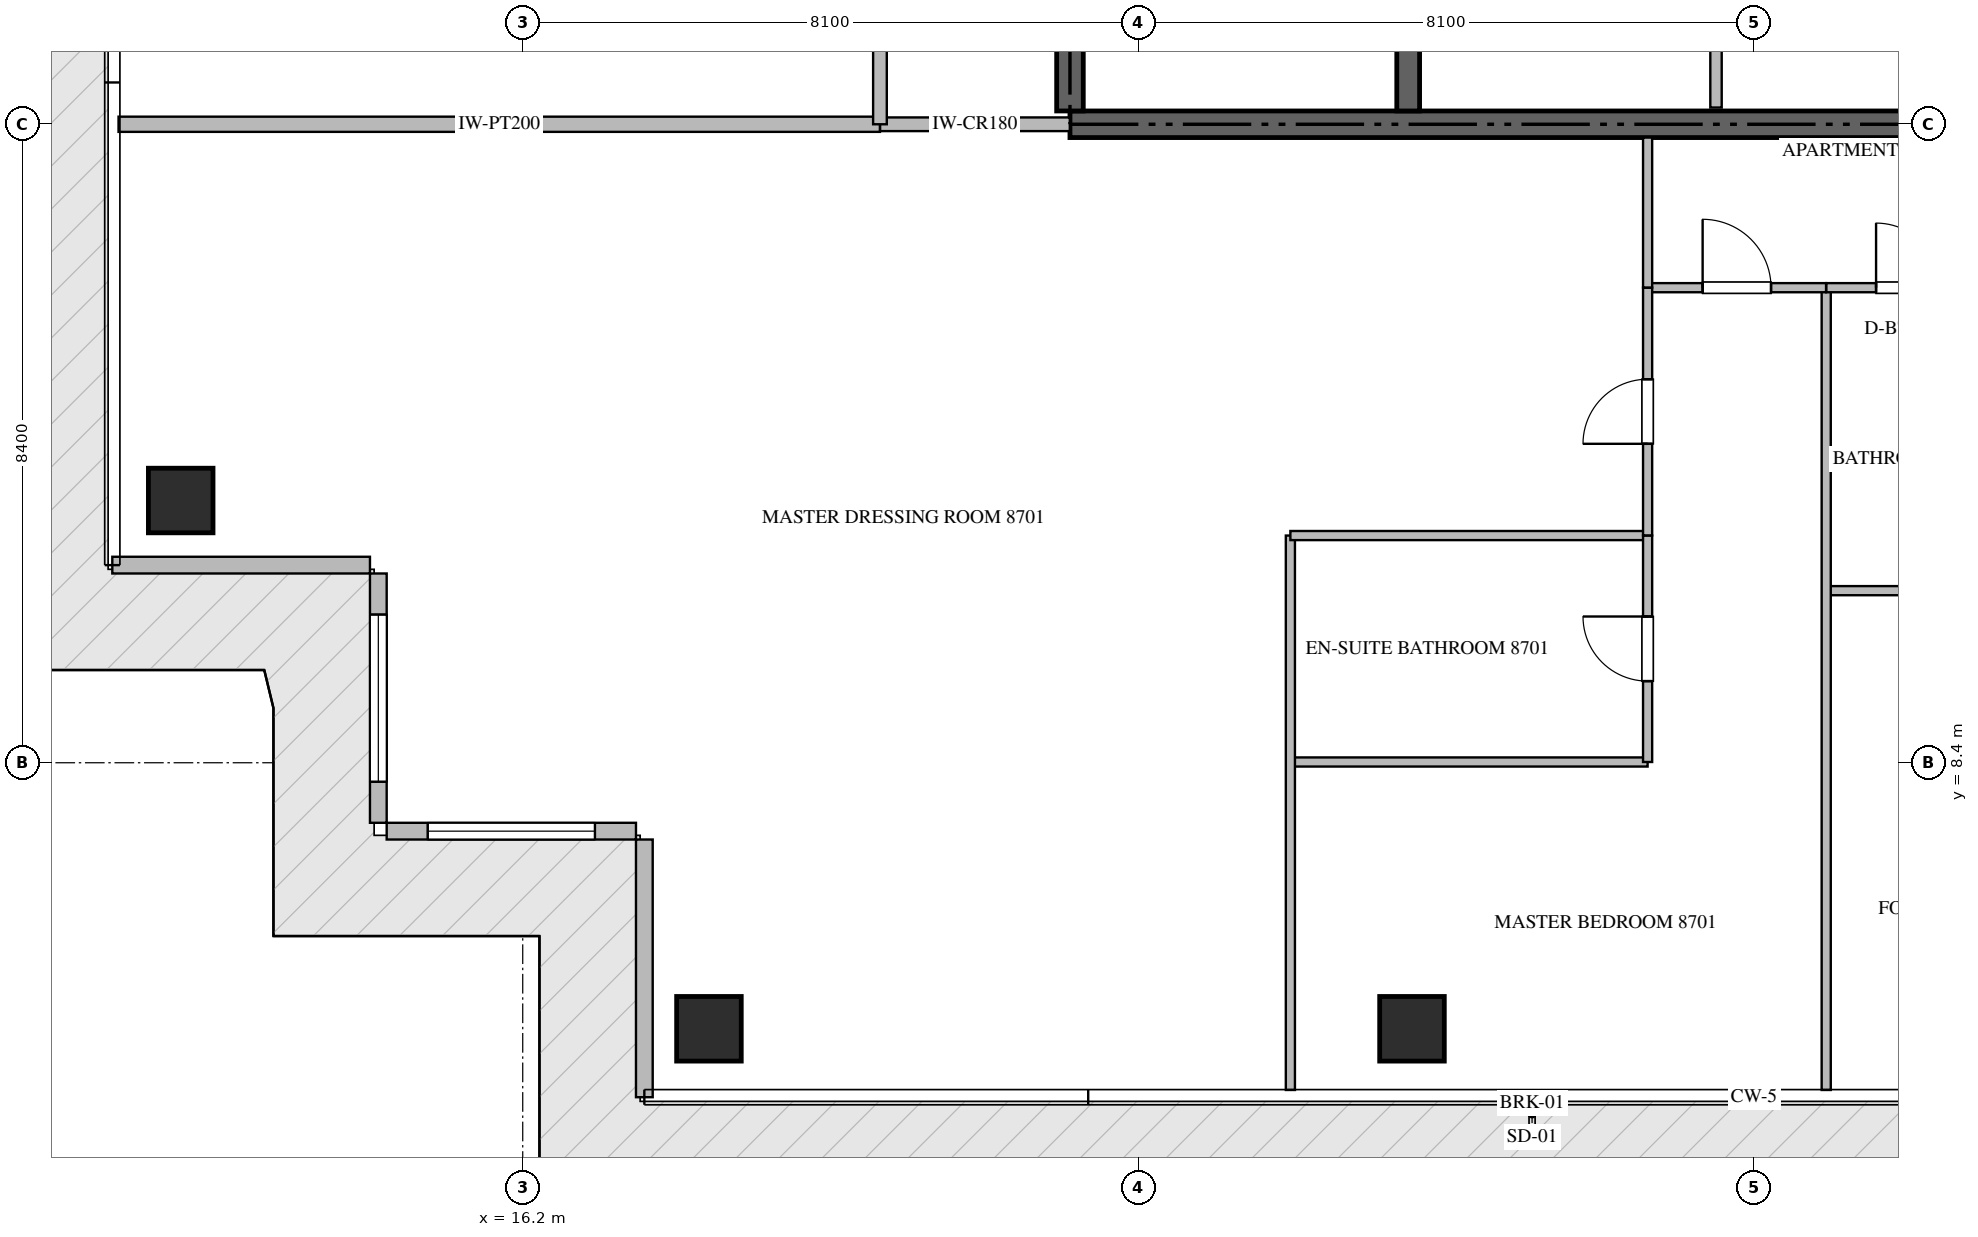
"""IFC4 building model, lengths in metres.
Left out: names, types, materials, properties, quantities, classifications, styles, units other than length and angle.
Written with IfcOpenShell. Run it as: python <this file> out.ifc"""

import sys

from ifc_helpers import new_model, si_unit, direction, frame, frame_2d, origin, origin_2d, place, context, subcontext, project, spatial, rectangle, extrude, source, transform, mapped, element, fill, save


model = new_model("IFC4")
c1 = context("Model", 3, precision=1e-05, world=origin(), true_north=direction((0.0, 1.0)))
c2 = subcontext(c1, "Body", "Model", "MODEL_VIEW")
j1 = project(units=[si_unit("LENGTHUNIT", "METRE"), si_unit("PLANEANGLEUNIT", "RADIAN")], contexts=[c1])
p1 = place(None, origin())
s1 = spatial("IfcSite", under=j1, at=p1, CompositionType="ELEMENT")
p2 = place(p1, origin())
s2 = spatial("IfcBuilding", under=s1, at=p2, CompositionType="ELEMENT")
p3 = place(p2, frame((0.0, 0.0, 353.85)))
s3 = spatial("IfcBuildingStorey", under=s2, at=p3, CompositionType="ELEMENT", Elevation=353.85)
p4 = place(p3, frame((23.4, 16.8, -0.26), z_axis=(0.0, 0.0, 1.0), x_axis=(1.0, 0.0, 0.0)))
e1 = element("IfcWall", 1, at=p4, inside=s3, PredefinedType="SHEAR", context=c2, shape_type="SweptSolid", body=[
    extrude(rectangle(XDim=18.0, YDim=0.35, at=frame_2d((9.0, 0.0))), origin(), (0.0, 0.0, 1.0), 5.798),
])
p5 = place(p3, frame((23.4, 16.975, -0.26), z_axis=(0.0, 0.0, 1.0), x_axis=(0.0, 1.0, 0.0)))
e2 = element("IfcWall", 2, at=p5, inside=s3, PredefinedType="SHEAR", context=c2, shape_type="SweptSolid", body=[
    extrude(rectangle(XDim=4.875, YDim=0.35, at=frame_2d((2.438, 0.0))), origin(), (0.0, 0.0, 1.0), 5.798),
])
p6 = place(p3, frame((27.85, 16.975, -0.26), z_axis=(0.0, 0.0, 1.0), x_axis=(0.0, 1.0, 0.0)))
e3 = element("IfcWall", 3, at=p6, inside=s3, PredefinedType="SHEAR", context=c2, shape_type="SweptSolid", body=[
    extrude(rectangle(XDim=4.875, YDim=0.3, at=frame_2d((2.438, 0.0))), origin(), (0.0, 0.0, 1.0), 5.798),
])
m1 = source(origin(), c2, "Body", "SweptSolid", [
    extrude(rectangle(XDim=0.85, YDim=0.85, at=origin_2d()), origin(), (0.0, 0.0, 1.0), 5.8),
])
for number, where, z_axis, x_axis in (
    (4, (18.65, 4.9, -0.26), (0.0, 0.0, 1.0), (1.0, 0.0, 0.0)),
    (5, (27.9, 4.9, -0.26), (0.0, 0.0, 1.0), (1.0, 0.0, 0.0)),
    (6, (11.7, 11.85, -0.26), (0.0, 0.0, 1.0), (1.0, 0.0, 0.0)),
):
    element("IfcColumn", number, at=place(p3, frame(where, z_axis=z_axis, x_axis=x_axis)), inside=s3, PredefinedType="COLUMN", context=c2, shape_type="MappedRepresentation", body=[
        mapped(m1, transform((0.0, 0.0, 0.0), scale=1.0)),
    ])
p7 = place(p3, frame((10.8, 11.0, 0.0), z_axis=(0.0, 0.0, 1.0), x_axis=(1.0, 0.0, 0.0)))
e7 = element("IfcWall", 7, at=p7, inside=s3, PredefinedType="ELEMENTEDWALL", context=c2, shape_type="SweptSolid", body=[
    extrude(rectangle(XDim=3.39, YDim=0.22, at=frame_2d((1.695, 0.0))), origin(), (0.0, 0.0, 1.0), 5.525),
])
p8 = place(p3, frame((14.3, 10.89, 0.0), z_axis=(0.0, 0.0, 1.0), x_axis=(0.0, -1.0, 0.0)))
e8 = element("IfcWall", 8, at=p8, inside=s3, PredefinedType="ELEMENTEDWALL", context=c2, shape_type="SweptSolid", body=[
    extrude(rectangle(XDim=3.28, YDim=0.22, at=frame_2d((1.64, 0.0))), origin(), (0.0, 0.0, 1.0), 5.525),
])
p9 = place(p8, frame((0.54, 0.0, 0.65)))
e9 = element("IfcOpeningElement", 9, at=p9, cuts=e8, PredefinedType="OPENING", context=c2, shape_type="SweptSolid", body=[
    extrude(rectangle(XDim=2.2, YDim=2.4, at=frame_2d((1.1, 1.2))), frame((0.0, 0.12, 0.0), z_axis=(0.0, -1.0, 0.0), x_axis=(1.0, 0.0, 0.0)), (0.0, 0.0, 1.0), 0.24),
])
p10 = place(p3, frame((14.41, 7.5, 0.0), z_axis=(0.0, 0.0, 1.0), x_axis=(1.0, 0.0, 0.0)))
e10 = element("IfcWall", 10, at=p10, inside=s3, PredefinedType="ELEMENTEDWALL", context=c2, shape_type="SweptSolid", body=[
    extrude(rectangle(XDim=3.28, YDim=0.22, at=frame_2d((1.64, 0.0))), origin(), (0.0, 0.0, 1.0), 5.525),
])
p11 = place(p10, frame((0.54, 0.0, 0.65)))
e11 = element("IfcOpeningElement", 11, at=p11, cuts=e10, PredefinedType="OPENING", context=c2, shape_type="SweptSolid", body=[
    extrude(rectangle(XDim=2.2, YDim=2.4, at=frame_2d((1.1, 1.2))), frame((0.0, 0.12, 0.0), z_axis=(0.0, -1.0, 0.0), x_axis=(1.0, 0.0, 0.0)), (0.0, 0.0, 1.0), 0.24),
])
p12 = place(p3, frame((17.8, 7.39, 0.0), z_axis=(0.0, 0.0, 1.0), x_axis=(0.0, -1.0, 0.0)))
e12 = element("IfcWall", 12, at=p12, inside=s3, PredefinedType="ELEMENTEDWALL", context=c2, shape_type="SweptSolid", body=[
    extrude(rectangle(XDim=3.39, YDim=0.22, at=frame_2d((1.695, 0.0))), origin(), (0.0, 0.0, 1.0), 5.525),
])
p13 = place(p3, frame((31.9, 17.02, 0.0), z_axis=(0.0, 0.0, 1.0), x_axis=(0.0, 1.0, 0.0)))
e13 = element("IfcWall", 13, at=p13, inside=s3, PredefinedType="PARTITIONING", context=c2, shape_type="SweptSolid", body=[
    extrude(rectangle(XDim=2.73, YDim=0.15, at=frame_2d((1.365, 0.0))), origin(), (0.0, 0.0, 1.0), 5.54),
])
p14 = place(p3, frame((10.882, 16.8, 0.0), z_axis=(0.0, 0.0, 1.0), x_axis=(1.0, 0.0, 0.0)))
e14 = element("IfcWall", 14, at=p14, inside=s3, PredefinedType="PARTITIONING", context=c2, shape_type="SweptSolid", body=[
    extrude(rectangle(XDim=10.018, YDim=0.2, at=frame_2d((5.009, 0.0))), origin(), (0.0, 0.0, 1.0), 5.54),
])
p15 = place(p3, frame((20.902, 16.8, 0.0), z_axis=(0.0, 0.0, 1.0), x_axis=(1.0, 0.0, 0.0)))
e15 = element("IfcWall", 15, at=p15, inside=s3, PredefinedType="PARTITIONING", context=c2, shape_type="SweptSolid", body=[
    extrude(rectangle(XDim=2.496, YDim=0.18, at=frame_2d((1.248, 0.0))), origin(), (0.0, 0.0, 1.0), 5.54),
])
p16 = place(p3, frame((20.9, 16.8, 0.0), z_axis=(0.0, 0.0, 1.0), x_axis=(0.0, 1.0, 0.0)))
e16 = element("IfcWall", 16, at=p16, inside=s3, PredefinedType="PARTITIONING", context=c2, shape_type="SweptSolid", body=[
    extrude(rectangle(XDim=16.8, YDim=0.18, at=frame_2d((8.4, 0.0))), origin(), (0.0, 0.0, 1.0), 5.54),
])
p17 = place(p16, frame((1.3, 0.0, 0.0)))
e17 = element("IfcOpeningElement", 17, at=p17, cuts=e16, PredefinedType="OPENING", context=c2, shape_type="SweptSolid", body=[
    extrude(rectangle(XDim=1.0, YDim=2.15, at=frame_2d((0.5, 1.075))), frame((0.0, 0.1, 0.0), z_axis=(0.0, -1.0, 0.0), x_axis=(1.0, 0.0, 0.0)), (0.0, 0.0, 1.0), 0.2),
])
p18 = place(p3, frame((33.35, 10.664, 0.0), z_axis=(0.0, 0.0, 1.0), x_axis=(1.0, 0.0, 0.0)))
e18 = element("IfcWall", 18, at=p18, inside=s3, PredefinedType="PARTITIONING", context=c2, shape_type="SweptSolid", body=[
    extrude(rectangle(XDim=5.15, YDim=0.12, at=frame_2d((2.575, 0.0))), origin(), (0.0, 0.0, 1.0), 5.54),
])
p19 = place(p3, frame((33.35, 4.095, 0.0), z_axis=(0.0, 0.0, 1.0), x_axis=(0.0, 1.0, 0.0)))
e19 = element("IfcWall", 19, at=p19, inside=s3, PredefinedType="PARTITIONING", context=c2, shape_type="SweptSolid", body=[
    extrude(rectangle(XDim=10.555, YDim=0.12, at=frame_2d((5.277, 0.0))), origin(), (0.0, 0.0, 1.0), 5.54),
])
p20 = place(p3, frame((33.35, 14.65, 0.0), z_axis=(0.0, 0.0, 1.0), x_axis=(1.0, 0.0, 0.0)))
e20 = element("IfcWall", 20, at=p20, inside=s3, PredefinedType="PARTITIONING", context=c2, shape_type="SweptSolid", body=[
    extrude(rectangle(XDim=2.163, YDim=0.12, at=frame_2d((1.082, 0.0))), origin(), (0.0, 0.0, 1.0), 5.54),
])
p21 = place(p20, frame((0.656, 0.0, 0.0)))
e21 = element("IfcOpeningElement", 21, at=p21, cuts=e20, PredefinedType="OPENING", context=c2, shape_type="SweptSolid", body=[
    extrude(rectangle(XDim=0.85, YDim=2.1, at=frame_2d((0.425, 1.05))), frame((0.0, 0.07, 0.0), z_axis=(0.0, -1.0, 0.0), x_axis=(1.0, 0.0, 0.0)), (0.0, 0.0, 1.0), 0.14),
])
p22 = place(p3, frame((31.0, 14.65, 0.0), z_axis=(0.0, 0.0, 1.0), x_axis=(1.0, 0.0, 0.0)))
e22 = element("IfcWall", 22, at=p22, inside=s3, PredefinedType="PARTITIONING", context=c2, shape_type="SweptSolid", body=[
    extrude(rectangle(XDim=2.348, YDim=0.12, at=frame_2d((1.174, 0.0))), origin(), (0.0, 0.0, 1.0), 5.54),
])
p23 = place(p22, frame((0.724, 0.0, 0.0)))
e23 = element("IfcOpeningElement", 23, at=p23, cuts=e22, PredefinedType="OPENING", context=c2, shape_type="SweptSolid", body=[
    extrude(rectangle(XDim=0.9, YDim=2.1, at=frame_2d((0.45, 1.05))), frame((0.0, 0.07, 0.0), z_axis=(0.0, -1.0, 0.0), x_axis=(1.0, 0.0, 0.0)), (0.0, 0.0, 1.0), 0.14),
])
p24 = place(p3, frame((26.3, 8.41, 0.0), z_axis=(0.0, 0.0, 1.0), x_axis=(1.0, 0.0, 0.0)))
e24 = element("IfcWall", 24, at=p24, inside=s3, PredefinedType="PARTITIONING", context=c2, shape_type="SweptSolid", body=[
    extrude(rectangle(XDim=4.7, YDim=0.12, at=frame_2d((2.35, 0.0))), origin(), (0.0, 0.0, 1.0), 5.54),
])
p25 = place(p3, frame((26.3, 4.095, 0.0), z_axis=(0.0, 0.0, 1.0), x_axis=(0.0, 1.0, 0.0)))
e25 = element("IfcWall", 25, at=p25, inside=s3, PredefinedType="PARTITIONING", context=c2, shape_type="SweptSolid", body=[
    extrude(rectangle(XDim=7.294, YDim=0.12, at=frame_2d((3.647, 0.0))), origin(), (0.0, 0.0, 1.0), 5.54),
])
p26 = place(p3, frame((26.3, 11.389, 0.0), z_axis=(0.0, 0.0, 1.0), x_axis=(1.0, 0.0, 0.0)))
e26 = element("IfcWall", 26, at=p26, inside=s3, PredefinedType="PARTITIONING", context=c2, shape_type="SweptSolid", body=[
    extrude(rectangle(XDim=4.7, YDim=0.12, at=frame_2d((2.35, 0.0))), origin(), (0.0, 0.0, 1.0), 5.54),
])
p27 = place(p3, frame((31.0, 8.41, 0.0), z_axis=(0.0, 0.0, 1.0), x_axis=(0.0, 1.0, 0.0)))
e27 = element("IfcWall", 27, at=p27, inside=s3, PredefinedType="PARTITIONING", context=c2, shape_type="SweptSolid", body=[
    extrude(rectangle(XDim=2.979, YDim=0.12, at=frame_2d((1.49, 0.0))), origin(), (0.0, 0.0, 1.0), 5.54),
])
p28 = place(p27, frame((1.064, 0.0, 0.0)))
e28 = element("IfcOpeningElement", 28, at=p28, cuts=e27, PredefinedType="OPENING", context=c2, shape_type="SweptSolid", body=[
    extrude(rectangle(XDim=0.85, YDim=2.1, at=frame_2d((0.425, 1.05))), frame((0.0, 0.07, 0.0), z_axis=(0.0, -1.0, 0.0), x_axis=(1.0, 0.0, 0.0)), (0.0, 0.0, 1.0), 0.14),
])
p29 = place(p3, frame((31.0, 11.391, 0.0), z_axis=(0.0, 0.0, 1.0), x_axis=(0.0, 1.0, 0.0)))
e29 = element("IfcWall", 29, at=p29, inside=s3, PredefinedType="PARTITIONING", context=c2, shape_type="SweptSolid", body=[
    extrude(rectangle(XDim=3.259, YDim=0.12, at=frame_2d((1.629, 0.0))), origin(), (0.0, 0.0, 1.0), 5.54),
])
p30 = place(p29, frame((1.205, 0.0, 0.0)))
e30 = element("IfcOpeningElement", 30, at=p30, cuts=e29, PredefinedType="OPENING", context=c2, shape_type="SweptSolid", body=[
    extrude(rectangle(XDim=0.85, YDim=2.1, at=frame_2d((0.425, 1.05))), frame((0.0, 0.07, 0.0), z_axis=(0.0, -1.0, 0.0), x_axis=(1.0, 0.0, 0.0)), (0.0, 0.0, 1.0), 0.14),
])
p31 = place(p3, frame((31.0, 14.652, 0.0), z_axis=(0.0, 0.0, 1.0), x_axis=(0.0, 1.0, 0.0)))
e31 = element("IfcWall", 31, at=p31, inside=s3, PredefinedType="PARTITIONING", context=c2, shape_type="SweptSolid", body=[
    extrude(rectangle(XDim=1.973, YDim=0.12, at=frame_2d((0.986, 0.0))), origin(), (0.0, 0.0, 1.0), 5.54),
])
m2 = source(origin(), c2, "Body", "SweptSolid", [
    extrude(rectangle(XDim=2.2, YDim=2.4, at=frame_2d((1.1, 1.2))), frame((0.0, 0.03, 0.0), z_axis=(0.0, -1.0, 0.0), x_axis=(1.0, 0.0, 0.0)), (0.0, 0.0, 1.0), 0.06),
])
p32 = place(p9, origin())
e32 = element("IfcWindow", 32, at=p32, inside=s3, PartitioningType="SINGLE_PANEL", PredefinedType="WINDOW", context=c2, shape_type="MappedRepresentation", body=[
    mapped(m2, transform((0.0, 0.0, 0.0), scale=1.0)),
])
fill(e9, e32)
p33 = place(p11, origin())
e33 = element("IfcWindow", 33, at=p33, inside=s3, PartitioningType="SINGLE_PANEL", PredefinedType="WINDOW", context=c2, shape_type="MappedRepresentation", body=[
    mapped(m2, transform((0.0, 0.0, 0.0), scale=1.0)),
])
fill(e11, e33)
m3 = source(origin(), c2, "Body", "SweptSolid", [
    extrude(rectangle(XDim=0.85, YDim=2.1, at=frame_2d((0.425, 1.05))), frame((0.0, 0.025, 0.0), z_axis=(0.0, -1.0, 0.0), x_axis=(1.0, 0.0, 0.0)), (0.0, 0.0, 1.0), 0.05),
])
p34 = place(p21, origin())
e34 = element("IfcDoor", 34, at=p34, inside=s3, OperationType="SINGLE_SWING_LEFT", PredefinedType="DOOR", context=c2, shape_type="MappedRepresentation", body=[
    mapped(m3, transform((0.0, 0.0, 0.0), scale=1.0)),
])
fill(e21, e34)
m4 = source(origin(), c2, "Body", "SweptSolid", [
    extrude(rectangle(XDim=0.9, YDim=2.1, at=frame_2d((0.45, 1.05))), frame((0.0, 0.025, 0.0), z_axis=(0.0, -1.0, 0.0), x_axis=(1.0, 0.0, 0.0)), (0.0, 0.0, 1.0), 0.05),
])
p35 = place(p23, origin())
e35 = element("IfcDoor", 35, at=p35, inside=s3, OperationType="SINGLE_SWING_LEFT", PredefinedType="DOOR", context=c2, shape_type="MappedRepresentation", body=[
    mapped(m4, transform((0.0, 0.0, 0.0), scale=1.0)),
])
fill(e23, e35)
p36 = place(p28, origin())
e36 = element("IfcDoor", 36, at=p36, inside=s3, OperationType="SINGLE_SWING_RIGHT", PredefinedType="DOOR", context=c2, shape_type="MappedRepresentation", body=[
    mapped(m3, transform((0.0, 0.0, 0.0), scale=1.0)),
])
fill(e28, e36)
p37 = place(p30, origin())
e37 = element("IfcDoor", 37, at=p37, inside=s3, OperationType="SINGLE_SWING_LEFT", PredefinedType="DOOR", context=c2, shape_type="MappedRepresentation", body=[
    mapped(m3, transform((0.0, 0.0, 0.0), scale=1.0)),
])
fill(e30, e37)
save(model, sys.argv[1])
